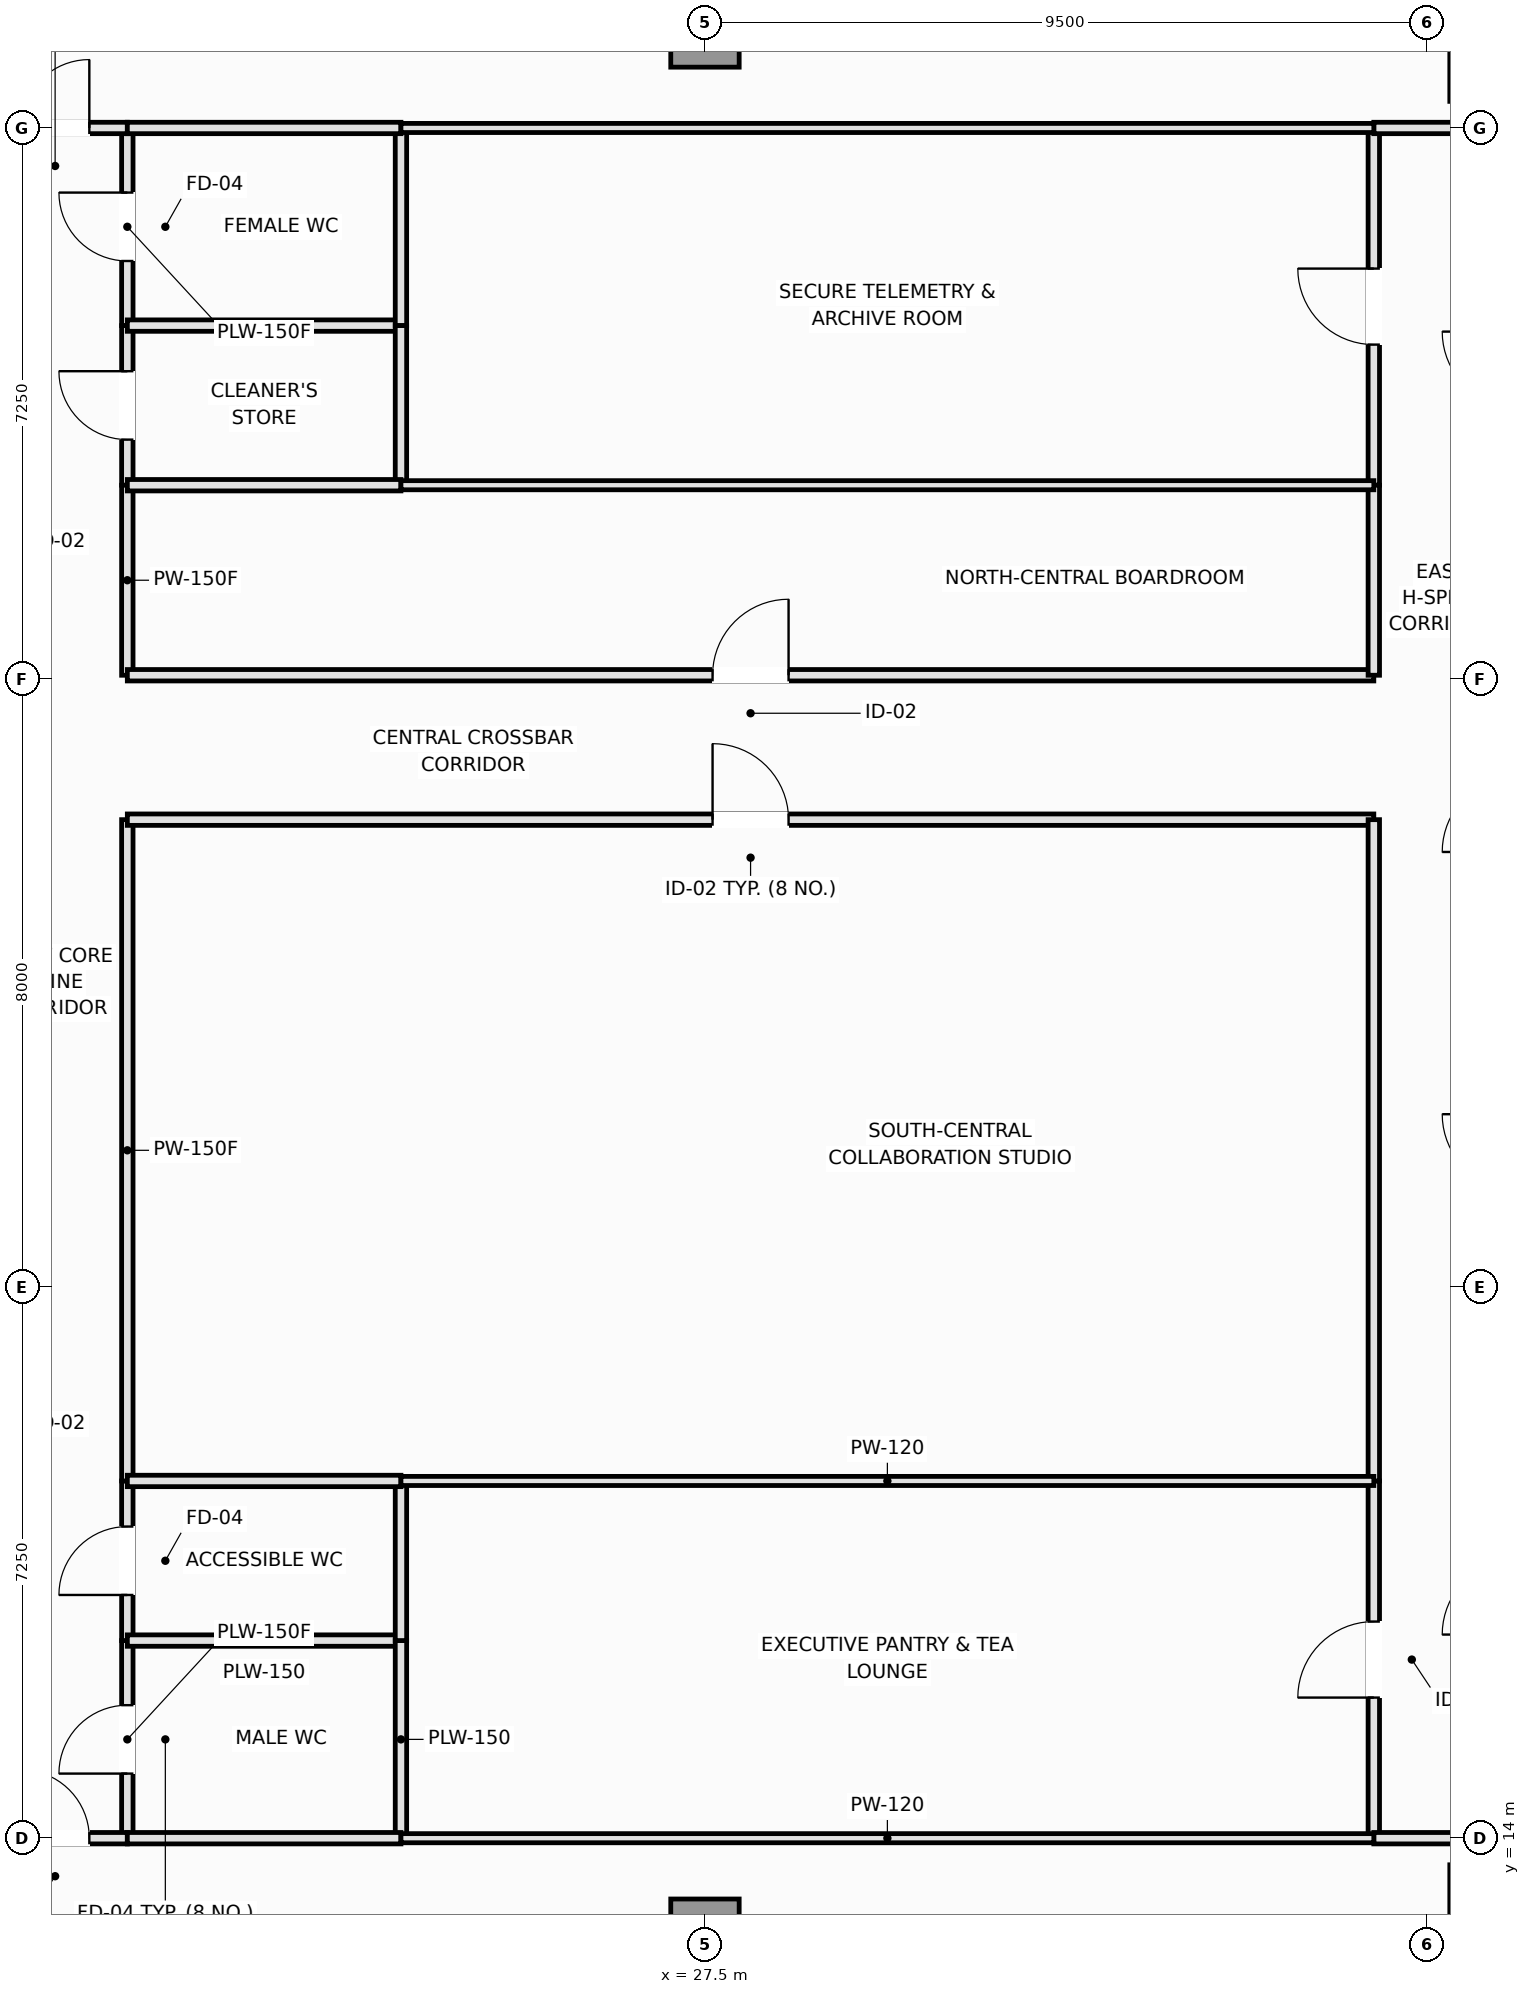
"""IFC4 building model, lengths in metres.
Left out: names, types, materials, properties, quantities, classifications, styles, units other than length and angle.
Written with IfcOpenShell. Run it as: python <this file> out.ifc"""

import sys

from ifc_helpers import new_model, si_unit, direction, frame, frame_2d, origin, origin_2d, place, context, subcontext, project, spatial, rectangle, extrude, element, fill, save


model = new_model("IFC4")
c1 = context("Model", 3, precision=1e-05, world=origin(), true_north=direction((0.0, 1.0)))
c2 = subcontext(c1, "Body", "Model", "MODEL_VIEW")
j1 = project(units=[si_unit("LENGTHUNIT", "METRE"), si_unit("PLANEANGLEUNIT", "RADIAN")], contexts=[c1])
p1 = place(None, origin())
s1 = spatial("IfcSite", under=j1, at=p1, CompositionType="ELEMENT")
p2 = place(p1, origin())
s2 = spatial("IfcBuilding", under=s1, at=p2, CompositionType="ELEMENT")
p3 = place(p2, frame((0.0, 0.0, 202.25)))
s3 = spatial("IfcBuildingStorey", under=s2, at=p3, CompositionType="ELEMENT", Elevation=202.25)
for number, where, z_axis, x_axis in (
    (1, (38.2, 12.75, 0.0), (0.0, 0.0, 1.0), (1.0, 0.0, 0.0)),
    (2, (38.2, 37.75, 0.0), (0.0, 0.0, 1.0), (1.0, 0.0, 0.0)),
):
    element("IfcColumn", number, at=place(p3, frame(where, z_axis=z_axis, x_axis=x_axis)), inside=s3, PredefinedType="COLUMN", context=c2, shape_type="SweptSolid", body=[
        extrude(rectangle(XDim=1.8, YDim=1.8, at=origin_2d()), origin(), (0.0, 0.0, 1.0), 3.55),
    ])
for number, where, z_axis, x_axis in (
    (3, (27.5, 12.75, 0.0), (0.0, 0.0, 1.0), (1.0, 0.0, 0.0)),
    (4, (27.5, 37.75, 0.0), (0.0, 0.0, 1.0), (1.0, 0.0, 0.0)),
):
    element("IfcColumn", number, at=place(p3, frame(where, z_axis=z_axis, x_axis=x_axis)), inside=s3, PredefinedType="COLUMN", context=c2, shape_type="SweptSolid", body=[
        extrude(rectangle(XDim=0.9, YDim=0.9, at=origin_2d()), origin(), (0.0, 0.0, 1.0), 3.55),
    ])
p4 = place(p3, frame((19.9, 14.0, 0.0), z_axis=(0.0, 0.0, 1.0), x_axis=(0.0, 1.0, 0.0)))
e5 = element("IfcWall", 5, at=p4, inside=s3, PredefinedType="PLUMBINGWALL", context=c2, shape_type="SweptSolid", body=[
    extrude(rectangle(XDim=2.6, YDim=0.15, at=frame_2d((1.3, 0.0))), origin(), (0.0, 0.0, 1.0), 3.37),
])
p5 = place(p4, frame((0.85, 0.0, 0.0)))
e6 = element("IfcOpeningElement", 6, at=p5, cuts=e5, PredefinedType="OPENING", context=c2, shape_type="SweptSolid", body=[
    extrude(rectangle(XDim=0.9, YDim=2.1, at=frame_2d((0.45, 1.05))), frame((0.0, 0.085, 0.0), z_axis=(0.0, -1.0, 0.0), x_axis=(1.0, 0.0, 0.0)), (0.0, 0.0, 1.0), 0.17),
])
p6 = place(p3, frame((19.9, 33.9, 0.0), z_axis=(0.0, 0.0, 1.0), x_axis=(0.0, 1.0, 0.0)))
e7 = element("IfcWall", 7, at=p6, inside=s3, PredefinedType="PLUMBINGWALL", context=c2, shape_type="SweptSolid", body=[
    extrude(rectangle(XDim=2.6, YDim=0.15, at=frame_2d((1.3, 0.0))), origin(), (0.0, 0.0, 1.0), 3.37),
])
p7 = place(p6, frame((0.85, 0.0, 0.0)))
e8 = element("IfcOpeningElement", 8, at=p7, cuts=e7, PredefinedType="OPENING", context=c2, shape_type="SweptSolid", body=[
    extrude(rectangle(XDim=0.9, YDim=2.1, at=frame_2d((0.45, 1.05))), frame((0.0, 0.085, 0.0), z_axis=(0.0, -1.0, 0.0), x_axis=(1.0, 0.0, 0.0)), (0.0, 0.0, 1.0), 0.17),
])
p8 = place(p3, frame((19.9, 16.6, 0.0), z_axis=(0.0, 0.0, 1.0), x_axis=(0.0, 1.0, 0.0)))
e9 = element("IfcWall", 9, at=p8, inside=s3, PredefinedType="PLUMBINGWALL", context=c2, shape_type="SweptSolid", body=[
    extrude(rectangle(XDim=2.1, YDim=0.15, at=frame_2d((1.05, 0.0))), origin(), (0.0, 0.0, 1.0), 3.37),
])
p9 = place(p8, frame((0.6, 0.0, 0.0)))
e10 = element("IfcOpeningElement", 10, at=p9, cuts=e9, PredefinedType="OPENING", context=c2, shape_type="SweptSolid", body=[
    extrude(rectangle(XDim=0.9, YDim=2.1, at=frame_2d((0.45, 1.05))), frame((0.0, 0.085, 0.0), z_axis=(0.0, -1.0, 0.0), x_axis=(1.0, 0.0, 0.0)), (0.0, 0.0, 1.0), 0.17),
])
p10 = place(p3, frame((19.9, 31.8, 0.0), z_axis=(0.0, 0.0, 1.0), x_axis=(0.0, 1.0, 0.0)))
e11 = element("IfcWall", 11, at=p10, inside=s3, PredefinedType="PLUMBINGWALL", context=c2, shape_type="SweptSolid", body=[
    extrude(rectangle(XDim=2.1, YDim=0.15, at=frame_2d((1.05, 0.0))), origin(), (0.0, 0.0, 1.0), 3.37),
])
p11 = place(p10, frame((0.6, 0.0, 0.0)))
e12 = element("IfcOpeningElement", 12, at=p11, cuts=e11, PredefinedType="OPENING", context=c2, shape_type="SweptSolid", body=[
    extrude(rectangle(XDim=0.9, YDim=2.1, at=frame_2d((0.45, 1.05))), frame((0.0, 0.085, 0.0), z_axis=(0.0, -1.0, 0.0), x_axis=(1.0, 0.0, 0.0)), (0.0, 0.0, 1.0), 0.17),
])
p12 = place(p3, frame((19.9, 18.7, 0.0), z_axis=(0.0, 0.0, 1.0), x_axis=(0.0, 1.0, 0.0)))
e13 = element("IfcWall", 13, at=p12, inside=s3, PredefinedType="PARTITIONING", context=c2, shape_type="SweptSolid", body=[
    extrude(rectangle(XDim=8.7, YDim=0.15, at=frame_2d((4.35, 0.0))), origin(), (0.0, 0.0, 1.0), 3.37),
])
p13 = place(p3, frame((19.9, 29.3, 0.0), z_axis=(0.0, 0.0, 1.0), x_axis=(0.0, 1.0, 0.0)))
e14 = element("IfcWall", 14, at=p13, inside=s3, PredefinedType="PARTITIONING", context=c2, shape_type="SweptSolid", body=[
    extrude(rectangle(XDim=2.5, YDim=0.15, at=frame_2d((1.25, 0.0))), origin(), (0.0, 0.0, 1.0), 3.37),
])
p14 = place(p3, frame((18.0, 14.0, 0.0), z_axis=(0.0, 0.0, 1.0), x_axis=(1.0, 0.0, 0.0)))
e15 = element("IfcWall", 15, at=p14, inside=s3, PredefinedType="PARTITIONING", context=c2, shape_type="SweptSolid", body=[
    extrude(rectangle(XDim=1.9, YDim=0.15, at=frame_2d((0.95, 0.0))), origin(), (0.0, 0.0, 1.0), 3.37),
])
p15 = place(p14, frame((0.5, 0.0, 0.0)))
e16 = element("IfcOpeningElement", 16, at=p15, cuts=e15, PredefinedType="OPENING", context=c2, shape_type="SweptSolid", body=[
    extrude(rectangle(XDim=0.9, YDim=2.1, at=frame_2d((0.45, 1.05))), frame((0.0, 0.085, 0.0), z_axis=(0.0, -1.0, 0.0), x_axis=(1.0, 0.0, 0.0)), (0.0, 0.0, 1.0), 0.17),
])
p16 = place(p3, frame((18.0, 36.5, 0.0), z_axis=(0.0, 0.0, 1.0), x_axis=(1.0, 0.0, 0.0)))
e17 = element("IfcWall", 17, at=p16, inside=s3, PredefinedType="PARTITIONING", context=c2, shape_type="SweptSolid", body=[
    extrude(rectangle(XDim=1.9, YDim=0.15, at=frame_2d((0.95, 0.0))), origin(), (0.0, 0.0, 1.0), 3.37),
])
p17 = place(p16, frame((0.5, 0.0, 0.0)))
e18 = element("IfcOpeningElement", 18, at=p17, cuts=e17, PredefinedType="OPENING", context=c2, shape_type="SweptSolid", body=[
    extrude(rectangle(XDim=0.9, YDim=2.1, at=frame_2d((0.45, 1.05))), frame((0.0, 0.085, 0.0), z_axis=(0.0, -1.0, 0.0), x_axis=(1.0, 0.0, 0.0)), (0.0, 0.0, 1.0), 0.17),
])
p18 = place(p3, frame((19.9, 27.4, 0.0), z_axis=(0.0, 0.0, 1.0), x_axis=(1.0, 0.0, 0.0)))
e19 = element("IfcWall", 19, at=p18, inside=s3, PredefinedType="PARTITIONING", context=c2, shape_type="SweptSolid", body=[
    extrude(rectangle(XDim=16.4, YDim=0.15, at=frame_2d((8.2, 0.0))), origin(), (0.0, 0.0, 1.0), 3.37),
])
p19 = place(p18, frame((7.7, 0.0, 0.0)))
e20 = element("IfcOpeningElement", 20, at=p19, cuts=e19, PredefinedType="OPENING", context=c2, shape_type="SweptSolid", body=[
    extrude(rectangle(XDim=1.0, YDim=2.15, at=frame_2d((0.5, 1.075))), frame((0.0, 0.085, 0.0), z_axis=(0.0, -1.0, 0.0), x_axis=(1.0, 0.0, 0.0)), (0.0, 0.0, 1.0), 0.17),
])
p20 = place(p3, frame((19.9, 29.3, 0.0), z_axis=(0.0, 0.0, 1.0), x_axis=(1.0, 0.0, 0.0)))
e21 = element("IfcWall", 21, at=p20, inside=s3, PredefinedType="PARTITIONING", context=c2, shape_type="SweptSolid", body=[
    extrude(rectangle(XDim=16.4, YDim=0.15, at=frame_2d((8.2, 0.0))), origin(), (0.0, 0.0, 1.0), 3.37),
])
p21 = place(p20, frame((7.7, 0.0, 0.0)))
e22 = element("IfcOpeningElement", 22, at=p21, cuts=e21, PredefinedType="OPENING", context=c2, shape_type="SweptSolid", body=[
    extrude(rectangle(XDim=1.0, YDim=2.15, at=frame_2d((0.5, 1.075))), frame((0.0, 0.085, 0.0), z_axis=(0.0, -1.0, 0.0), x_axis=(1.0, 0.0, 0.0)), (0.0, 0.0, 1.0), 0.17),
])
p22 = place(p3, frame((36.3, 14.0, 0.0), z_axis=(0.0, 0.0, 1.0), x_axis=(0.0, 1.0, 0.0)))
e23 = element("IfcWall", 23, at=p22, inside=s3, PredefinedType="PARTITIONING", context=c2, shape_type="SweptSolid", body=[
    extrude(rectangle(XDim=4.7, YDim=0.15, at=frame_2d((2.35, 0.0))), origin(), (0.0, 0.0, 1.0), 3.37),
])
p23 = place(p22, frame((1.85, 0.0, 0.0)))
e24 = element("IfcOpeningElement", 24, at=p23, cuts=e23, PredefinedType="OPENING", context=c2, shape_type="SweptSolid", body=[
    extrude(rectangle(XDim=1.0, YDim=2.15, at=frame_2d((0.5, 1.075))), frame((0.0, 0.085, 0.0), z_axis=(0.0, -1.0, 0.0), x_axis=(1.0, 0.0, 0.0)), (0.0, 0.0, 1.0), 0.17),
])
p24 = place(p3, frame((36.3, 31.8, 0.0), z_axis=(0.0, 0.0, 1.0), x_axis=(0.0, 1.0, 0.0)))
e25 = element("IfcWall", 25, at=p24, inside=s3, PredefinedType="PARTITIONING", context=c2, shape_type="SweptSolid", body=[
    extrude(rectangle(XDim=4.7, YDim=0.15, at=frame_2d((2.35, 0.0))), origin(), (0.0, 0.0, 1.0), 3.37),
])
p25 = place(p24, frame((1.85, 0.0, 0.0)))
e26 = element("IfcOpeningElement", 26, at=p25, cuts=e25, PredefinedType="OPENING", context=c2, shape_type="SweptSolid", body=[
    extrude(rectangle(XDim=1.0, YDim=2.15, at=frame_2d((0.5, 1.075))), frame((0.0, 0.085, 0.0), z_axis=(0.0, -1.0, 0.0), x_axis=(1.0, 0.0, 0.0)), (0.0, 0.0, 1.0), 0.17),
])
p26 = place(p3, frame((36.3, 18.7, 0.0), z_axis=(0.0, 0.0, 1.0), x_axis=(0.0, 1.0, 0.0)))
e27 = element("IfcWall", 27, at=p26, inside=s3, PredefinedType="PARTITIONING", context=c2, shape_type="SweptSolid", body=[
    extrude(rectangle(XDim=8.7, YDim=0.15, at=frame_2d((4.35, 0.0))), origin(), (0.0, 0.0, 1.0), 3.37),
])
p27 = place(p3, frame((36.3, 29.3, 0.0), z_axis=(0.0, 0.0, 1.0), x_axis=(0.0, 1.0, 0.0)))
e28 = element("IfcWall", 28, at=p27, inside=s3, PredefinedType="PARTITIONING", context=c2, shape_type="SweptSolid", body=[
    extrude(rectangle(XDim=2.5, YDim=0.15, at=frame_2d((1.25, 0.0))), origin(), (0.0, 0.0, 1.0), 3.37),
])
for number, where, z_axis, x_axis in (
    (29, (36.3, 14.0, 0.0), (0.0, 0.0, 1.0), (1.0, 0.0, 0.0)),
    (30, (36.3, 36.5, 0.0), (0.0, 0.0, 1.0), (1.0, 0.0, 0.0)),
):
    element("IfcWall", number, at=place(p3, frame(where, z_axis=z_axis, x_axis=x_axis)), inside=s3, PredefinedType="PARTITIONING", context=c2, shape_type="SweptSolid", body=[
        extrude(rectangle(XDim=1.9, YDim=0.15, at=frame_2d((0.95, 0.0))), origin(), (0.0, 0.0, 1.0), 3.37),
    ])
p28 = place(p3, frame((19.9, 16.6, 0.0), z_axis=(0.0, 0.0, 1.0), x_axis=(1.0, 0.0, 0.0)))
e31 = element("IfcWall", 31, at=p28, inside=s3, PredefinedType="PLUMBINGWALL", context=c2, shape_type="SweptSolid", body=[
    extrude(rectangle(XDim=3.6, YDim=0.15, at=frame_2d((1.8, 0.0))), origin(), (0.0, 0.0, 1.0), 3.37),
])
p29 = place(p3, frame((23.5, 14.0, 0.0), z_axis=(0.0, 0.0, 1.0), x_axis=(0.0, 1.0, 0.0)))
e32 = element("IfcWall", 32, at=p29, inside=s3, PredefinedType="PLUMBINGWALL", context=c2, shape_type="SweptSolid", body=[
    extrude(rectangle(XDim=2.6, YDim=0.15, at=frame_2d((1.3, 0.0))), origin(), (0.0, 0.0, 1.0), 3.37),
])
for number, where, z_axis, x_axis in (
    (33, (19.9, 14.0, 0.0), (0.0, 0.0, 1.0), (1.0, 0.0, 0.0)),
    (34, (19.9, 33.9, 0.0), (0.0, 0.0, 1.0), (1.0, 0.0, 0.0)),
):
    element("IfcWall", number, at=place(p3, frame(where, z_axis=z_axis, x_axis=x_axis)), inside=s3, PredefinedType="PLUMBINGWALL", context=c2, shape_type="SweptSolid", body=[
        extrude(rectangle(XDim=3.6, YDim=0.15, at=frame_2d((1.8, 0.0))), origin(), (0.0, 0.0, 1.0), 3.37),
    ])
p30 = place(p3, frame((23.5, 33.9, 0.0), z_axis=(0.0, 0.0, 1.0), x_axis=(0.0, 1.0, 0.0)))
e35 = element("IfcWall", 35, at=p30, inside=s3, PredefinedType="PLUMBINGWALL", context=c2, shape_type="SweptSolid", body=[
    extrude(rectangle(XDim=2.6, YDim=0.15, at=frame_2d((1.3, 0.0))), origin(), (0.0, 0.0, 1.0), 3.37),
])
p31 = place(p3, frame((19.9, 36.5, 0.0), z_axis=(0.0, 0.0, 1.0), x_axis=(1.0, 0.0, 0.0)))
e36 = element("IfcWall", 36, at=p31, inside=s3, PredefinedType="PLUMBINGWALL", context=c2, shape_type="SweptSolid", body=[
    extrude(rectangle(XDim=3.6, YDim=0.15, at=frame_2d((1.8, 0.0))), origin(), (0.0, 0.0, 1.0), 3.37),
])
p32 = place(p3, frame((23.5, 16.6, 0.0), z_axis=(0.0, 0.0, 1.0), x_axis=(0.0, 1.0, 0.0)))
e37 = element("IfcWall", 37, at=p32, inside=s3, PredefinedType="PLUMBINGWALL", context=c2, shape_type="SweptSolid", body=[
    extrude(rectangle(XDim=2.1, YDim=0.15, at=frame_2d((1.05, 0.0))), origin(), (0.0, 0.0, 1.0), 3.37),
])
p33 = place(p3, frame((19.9, 18.7, 0.0), z_axis=(0.0, 0.0, 1.0), x_axis=(1.0, 0.0, 0.0)))
e38 = element("IfcWall", 38, at=p33, inside=s3, PredefinedType="PLUMBINGWALL", context=c2, shape_type="SweptSolid", body=[
    extrude(rectangle(XDim=3.6, YDim=0.15, at=frame_2d((1.8, 0.0))), origin(), (0.0, 0.0, 1.0), 3.37),
])
p34 = place(p3, frame((23.5, 31.8, 0.0), z_axis=(0.0, 0.0, 1.0), x_axis=(0.0, 1.0, 0.0)))
e39 = element("IfcWall", 39, at=p34, inside=s3, PredefinedType="PLUMBINGWALL", context=c2, shape_type="SweptSolid", body=[
    extrude(rectangle(XDim=2.1, YDim=0.15, at=frame_2d((1.05, 0.0))), origin(), (0.0, 0.0, 1.0), 3.37),
])
p35 = place(p3, frame((19.9, 31.8, 0.0), z_axis=(0.0, 0.0, 1.0), x_axis=(1.0, 0.0, 0.0)))
e40 = element("IfcWall", 40, at=p35, inside=s3, PredefinedType="PLUMBINGWALL", context=c2, shape_type="SweptSolid", body=[
    extrude(rectangle(XDim=3.6, YDim=0.15, at=frame_2d((1.8, 0.0))), origin(), (0.0, 0.0, 1.0), 3.37),
])
for number, where, z_axis, x_axis in (
    (41, (23.5, 18.7, 0.0), (0.0, 0.0, 1.0), (1.0, 0.0, 0.0)),
    (42, (23.5, 14.0, 0.0), (0.0, 0.0, 1.0), (1.0, 0.0, 0.0)),
    (43, (23.5, 31.8, 0.0), (0.0, 0.0, 1.0), (1.0, 0.0, 0.0)),
    (44, (23.5, 36.5, 0.0), (0.0, 0.0, 1.0), (1.0, 0.0, 0.0)),
):
    element("IfcWall", number, at=place(p3, frame(where, z_axis=z_axis, x_axis=x_axis)), inside=s3, PredefinedType="PARTITIONING", context=c2, shape_type="SweptSolid", body=[
        extrude(rectangle(XDim=12.8, YDim=0.12, at=frame_2d((6.4, 0.0))), origin(), (0.0, 0.0, 1.0), 3.37),
    ])
p36 = place(p5, origin())
e45 = element("IfcDoor", 45, at=p36, inside=s3, OperationType="SINGLE_SWING_LEFT", PredefinedType="DOOR", context=c2, shape_type="SweptSolid", body=[
    extrude(rectangle(XDim=0.9, YDim=2.1, at=frame_2d((0.45, 1.05))), frame((0.0, 0.025, 0.0), z_axis=(0.0, -1.0, 0.0), x_axis=(1.0, 0.0, 0.0)), (0.0, 0.0, 1.0), 0.05),
])
fill(e6, e45)
p37 = place(p7, origin())
e46 = element("IfcDoor", 46, at=p37, inside=s3, OperationType="SINGLE_SWING_RIGHT", PredefinedType="DOOR", context=c2, shape_type="SweptSolid", body=[
    extrude(rectangle(XDim=0.9, YDim=2.1, at=frame_2d((0.45, 1.05))), frame((0.0, 0.025, 0.0), z_axis=(0.0, -1.0, 0.0), x_axis=(1.0, 0.0, 0.0)), (0.0, 0.0, 1.0), 0.05),
])
fill(e8, e46)
p38 = place(p9, origin())
e47 = element("IfcDoor", 47, at=p38, inside=s3, OperationType="SINGLE_SWING_LEFT", PredefinedType="DOOR", context=c2, shape_type="SweptSolid", body=[
    extrude(rectangle(XDim=0.9, YDim=2.1, at=frame_2d((0.45, 1.05))), frame((0.0, 0.025, 0.0), z_axis=(0.0, -1.0, 0.0), x_axis=(1.0, 0.0, 0.0)), (0.0, 0.0, 1.0), 0.05),
])
fill(e10, e47)
p39 = place(p11, origin())
e48 = element("IfcDoor", 48, at=p39, inside=s3, OperationType="SINGLE_SWING_RIGHT", PredefinedType="DOOR", context=c2, shape_type="SweptSolid", body=[
    extrude(rectangle(XDim=0.9, YDim=2.1, at=frame_2d((0.45, 1.05))), frame((0.0, 0.025, 0.0), z_axis=(0.0, -1.0, 0.0), x_axis=(1.0, 0.0, 0.0)), (0.0, 0.0, 1.0), 0.05),
])
fill(e12, e48)
p40 = place(p15, origin())
e49 = element("IfcDoor", 49, at=p40, inside=s3, OperationType="SINGLE_SWING_LEFT", PredefinedType="DOOR", context=c2, shape_type="SweptSolid", body=[
    extrude(rectangle(XDim=0.9, YDim=2.1, at=frame_2d((0.45, 1.05))), frame((0.0, 0.025, 0.0), z_axis=(0.0, -1.0, 0.0), x_axis=(1.0, 0.0, 0.0)), (0.0, 0.0, 1.0), 0.05),
])
fill(e16, e49)
p41 = place(p17, origin())
e50 = element("IfcDoor", 50, at=p41, inside=s3, OperationType="SINGLE_SWING_RIGHT", PredefinedType="DOOR", context=c2, shape_type="SweptSolid", body=[
    extrude(rectangle(XDim=0.9, YDim=2.1, at=frame_2d((0.45, 1.05))), frame((0.0, 0.025, 0.0), z_axis=(0.0, -1.0, 0.0), x_axis=(1.0, 0.0, 0.0)), (0.0, 0.0, 1.0), 0.05),
])
fill(e18, e50)
p42 = place(p19, origin())
e51 = element("IfcDoor", 51, at=p42, inside=s3, OperationType="SINGLE_SWING_LEFT", PredefinedType="DOOR", context=c2, shape_type="SweptSolid", body=[
    extrude(rectangle(XDim=1.0, YDim=2.15, at=frame_2d((0.5, 1.075))), frame((0.0, 0.025, 0.0), z_axis=(0.0, -1.0, 0.0), x_axis=(1.0, 0.0, 0.0)), (0.0, 0.0, 1.0), 0.05),
])
fill(e20, e51)
p43 = place(p21, origin())
e52 = element("IfcDoor", 52, at=p43, inside=s3, OperationType="SINGLE_SWING_RIGHT", PredefinedType="DOOR", context=c2, shape_type="SweptSolid", body=[
    extrude(rectangle(XDim=1.0, YDim=2.15, at=frame_2d((0.5, 1.075))), frame((0.0, 0.025, 0.0), z_axis=(0.0, -1.0, 0.0), x_axis=(1.0, 0.0, 0.0)), (0.0, 0.0, 1.0), 0.05),
])
fill(e22, e52)
p44 = place(p23, origin())
e53 = element("IfcDoor", 53, at=p44, inside=s3, OperationType="SINGLE_SWING_LEFT", PredefinedType="DOOR", context=c2, shape_type="SweptSolid", body=[
    extrude(rectangle(XDim=1.0, YDim=2.15, at=frame_2d((0.5, 1.075))), frame((0.0, 0.025, 0.0), z_axis=(0.0, -1.0, 0.0), x_axis=(1.0, 0.0, 0.0)), (0.0, 0.0, 1.0), 0.05),
])
fill(e24, e53)
p45 = place(p25, origin())
e54 = element("IfcDoor", 54, at=p45, inside=s3, OperationType="SINGLE_SWING_RIGHT", PredefinedType="DOOR", context=c2, shape_type="SweptSolid", body=[
    extrude(rectangle(XDim=1.0, YDim=2.15, at=frame_2d((0.5, 1.075))), frame((0.0, 0.025, 0.0), z_axis=(0.0, -1.0, 0.0), x_axis=(1.0, 0.0, 0.0)), (0.0, 0.0, 1.0), 0.05),
])
fill(e26, e54)
save(model, sys.argv[1])
